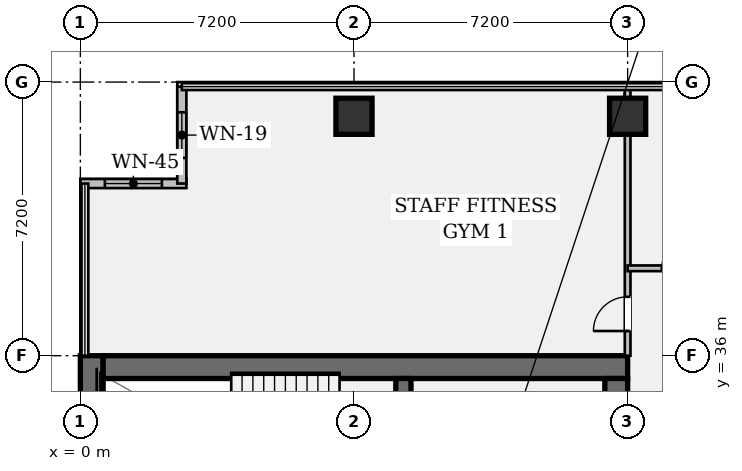
"""IFC4 building model, lengths in metres.
Left out: names, types, materials, properties, quantities, classifications, styles, units other than length and angle.
Written with IfcOpenShell. Run it as: python <this file> out.ifc"""

import sys

from ifc_helpers import new_model, si_unit, direction, frame, frame_2d, origin, origin_2d, place, context, subcontext, project, spatial, rectangle, hollow_rectangle, extrude, element, fill, save


model = new_model("IFC4")
c1 = context("Model", 3, precision=1e-05, world=origin(), true_north=direction((0.0, 1.0)))
c2 = subcontext(c1, "Body", "Model", "MODEL_VIEW")
j1 = project(units=[si_unit("LENGTHUNIT", "METRE"), si_unit("PLANEANGLEUNIT", "RADIAN")], contexts=[c1])
p1 = place(None, origin())
s1 = spatial("IfcSite", under=j1, at=p1, CompositionType="ELEMENT")
p2 = place(p1, origin())
s2 = spatial("IfcBuilding", under=s1, at=p2, CompositionType="ELEMENT")
p3 = place(p2, frame((0.0, 0.0, 81.2)))
s3 = spatial("IfcBuildingStorey", under=s2, at=p3, CompositionType="ELEMENT", Elevation=81.2)
p4 = place(p3, frame((0.3, 7.2, 0.0), z_axis=(0.0, 0.0, 1.0), x_axis=(0.0, 1.0, 0.0)))
e1 = element("IfcWall", 1, at=p4, inside=s3, PredefinedType="SHEAR", context=c2, shape_type="SweptSolid", body=[
    extrude(rectangle(XDim=28.8, YDim=0.6, at=frame_2d((14.4, 0.0))), origin(), (0.0, 0.0, 1.0), 3.57),
])
p5 = place(p3, frame((0.6, 35.7, 0.0), z_axis=(0.0, 0.0, 1.0), x_axis=(1.0, 0.0, 0.0)))
e2 = element("IfcWall", 2, at=p5, inside=s3, PredefinedType="SHEAR", context=c2, shape_type="SweptSolid", body=[
    extrude(rectangle(XDim=13.8, YDim=0.6, at=frame_2d((6.9, 0.0))), origin(), (0.0, 0.0, 1.0), 3.57),
])
p6 = place(p3, frame((14.1, 35.4, 0.0), z_axis=(0.0, 0.0, 1.0), x_axis=(0.0, -1.0, 0.0)))
e3 = element("IfcWall", 3, at=p6, inside=s3, PredefinedType="SHEAR", context=c2, shape_type="SweptSolid", body=[
    extrude(rectangle(XDim=27.6, YDim=0.6, at=frame_2d((13.8, 0.0))), origin(), (0.0, 0.0, 1.0), 3.57),
])
p7 = place(p6, frame((1.3, 0.0, 0.0)))
e4 = element("IfcOpeningElement", 4, at=p7, cuts=e3, PredefinedType="OPENING", context=c2, shape_type="SweptSolid", body=[
    extrude(rectangle(XDim=1.2, YDim=2.15, at=frame_2d((0.6, 1.075))), frame((0.0, 0.312, 0.0), z_axis=(0.0, -1.0, 0.0), x_axis=(1.0, 0.0, 0.0)), (0.0, 0.0, 1.0), 0.624),
])
p8 = place(p6, frame((25.25, 0.0, 0.0)))
e5 = element("IfcOpeningElement", 5, at=p8, cuts=e3, PredefinedType="OPENING", context=c2, shape_type="SweptSolid", body=[
    extrude(rectangle(XDim=1.2, YDim=2.15, at=frame_2d((0.6, 1.075))), frame((0.0, 0.312, 0.0), z_axis=(0.0, -1.0, 0.0), x_axis=(1.0, 0.0, 0.0)), (0.0, 0.0, 1.0), 0.624),
])
p9 = place(p6, frame((14.6, 0.0, 0.0)))
e6 = element("IfcOpeningElement", 6, at=p9, cuts=e3, PredefinedType="OPENING", context=c2, shape_type="SweptSolid", body=[
    extrude(rectangle(XDim=1.6, YDim=2.2, at=frame_2d((0.8, 1.1))), frame((0.0, 0.312, 0.0), z_axis=(0.0, -1.0, 0.0), x_axis=(1.0, 0.0, 0.0)), (0.0, 0.0, 1.0), 0.624),
])
p10 = place(p3, frame((8.5, 31.72, 0.0), z_axis=(0.0, 0.0, 1.0), x_axis=(0.0, 1.0, 0.0)))
e7 = element("IfcWall", 7, at=p10, inside=s3, PredefinedType="SHEAR", context=c2, shape_type="SweptSolid", body=[
    extrude(rectangle(XDim=3.68, YDim=0.4, at=frame_2d((1.84, 0.0))), origin(), (0.0, 0.0, 1.0), 3.57),
])
p11 = place(p10, frame((0.9, 0.0, 0.0)))
e8 = element("IfcOpeningElement", 8, at=p11, cuts=e7, PredefinedType="OPENING", context=c2, shape_type="SweptSolid", body=[
    extrude(rectangle(XDim=1.1, YDim=2.15, at=frame_2d((0.55, 1.075))), frame((0.0, 0.212, 0.0), z_axis=(0.0, -1.0, 0.0), x_axis=(1.0, 0.0, 0.0)), (0.0, 0.0, 1.0), 0.424),
])
for number, where, z_axis, x_axis in (
    (9, (7.2, 42.3, 0.0), (0.0, 0.0, 1.0), (1.0, 0.0, 0.0)),
    (10, (14.4, 42.3, 0.0), (0.0, 0.0, 1.0), (1.0, 0.0, 0.0)),
):
    element("IfcColumn", number, at=place(p3, frame(where, z_axis=z_axis, x_axis=x_axis)), inside=s3, PredefinedType="COLUMN", context=c2, shape_type="SweptSolid", body=[
        extrude(hollow_rectangle(XDim=0.95, YDim=0.95, WallThickness=0.06, at=origin_2d()), origin(), (0.0, 0.0, 1.0), 3.57),
    ])
p12 = place(p3, frame((0.0, 40.53, 0.0), z_axis=(0.0, 0.0, 1.0), x_axis=(1.0, 0.0, 0.0)))
e11 = element("IfcWall", 11, at=p12, inside=s3, PredefinedType="STANDARD", context=c2, shape_type="SweptSolid", body=[
    extrude(rectangle(XDim=2.79, YDim=0.24, at=frame_2d((1.395, 0.0))), origin(), (0.0, 0.0, 1.0), 3.57),
])
p13 = place(p12, frame((0.645, 0.0, 0.95)))
e12 = element("IfcOpeningElement", 12, at=p13, cuts=e11, PredefinedType="OPENING", context=c2, shape_type="SweptSolid", body=[
    extrude(rectangle(XDim=1.5, YDim=1.8, at=frame_2d((0.75, 0.9))), frame((0.0, 0.132, 0.0), z_axis=(0.0, -1.0, 0.0), x_axis=(1.0, 0.0, 0.0)), (0.0, 0.0, 1.0), 0.264),
])
p14 = place(p3, frame((2.67, 40.53, 0.0), z_axis=(0.0, 0.0, 1.0), x_axis=(0.0, 1.0, 0.0)))
e13 = element("IfcWall", 13, at=p14, inside=s3, PredefinedType="STANDARD", context=c2, shape_type="SweptSolid", body=[
    extrude(rectangle(XDim=2.55, YDim=0.24, at=frame_2d((1.275, 0.0))), origin(), (0.0, 0.0, 1.0), 3.57),
])
p15 = place(p14, frame((0.675, 0.0, 0.95)))
e14 = element("IfcOpeningElement", 14, at=p15, cuts=e13, PredefinedType="OPENING", context=c2, shape_type="SweptSolid", body=[
    extrude(rectangle(XDim=1.2, YDim=1.8, at=frame_2d((0.6, 0.9))), frame((0.0, 0.132, 0.0), z_axis=(0.0, -1.0, 0.0), x_axis=(1.0, 0.0, 0.0)), (0.0, 0.0, 1.0), 0.264),
])
p16 = place(p3, frame((14.4, 36.0, 0.0), z_axis=(0.0, 0.0, 1.0), x_axis=(0.0, 1.0, 0.0)))
e15 = element("IfcWall", 15, at=p16, inside=s3, PredefinedType="PARTITIONING", context=c2, shape_type="SweptSolid", body=[
    extrude(rectangle(XDim=7.08, YDim=0.15, at=frame_2d((3.54, 0.0))), origin(), (0.0, 0.0, 1.0), 2.783),
])
p17 = place(p16, frame((0.65, 0.0, 0.0)))
e16 = element("IfcOpeningElement", 16, at=p17, cuts=e15, PredefinedType="OPENING", context=c2, shape_type="SweptSolid", body=[
    extrude(rectangle(XDim=0.9, YDim=2.15, at=frame_2d((0.45, 1.075))), frame((0.0, 0.087, 0.0), z_axis=(0.0, -1.0, 0.0), x_axis=(1.0, 0.0, 0.0)), (0.0, 0.0, 1.0), 0.174),
])
p18 = place(p3, frame((14.4, 38.3, 0.0), z_axis=(0.0, 0.0, 1.0), x_axis=(1.0, 0.0, 0.0)))
e17 = element("IfcWall", 17, at=p18, inside=s3, PredefinedType="PARTITIONING", context=c2, shape_type="SweptSolid", body=[
    extrude(rectangle(XDim=2.95, YDim=0.15, at=frame_2d((1.475, 0.0))), origin(), (0.0, 0.0, 1.0), 2.783),
])
p19 = place(p18, frame((0.9, 0.0, 0.0)))
e18 = element("IfcOpeningElement", 18, at=p19, cuts=e17, PredefinedType="OPENING", context=c2, shape_type="SweptSolid", body=[
    extrude(rectangle(XDim=0.95, YDim=2.15, at=frame_2d((0.475, 1.075))), frame((0.0, 0.087, 0.0), z_axis=(0.0, -1.0, 0.0), x_axis=(1.0, 0.0, 0.0)), (0.0, 0.0, 1.0), 0.174),
])
p20 = place(p13, origin())
e19 = element("IfcWindow", 19, at=p20, inside=s3, PartitioningType="SINGLE_PANEL", PredefinedType="WINDOW", context=c2, shape_type="SweptSolid", body=[
    extrude(rectangle(XDim=1.5, YDim=1.8, at=frame_2d((0.75, 0.9))), frame((0.0, 0.03, 0.0), z_axis=(0.0, -1.0, 0.0), x_axis=(1.0, 0.0, 0.0)), (0.0, 0.0, 1.0), 0.06),
])
fill(e12, e19)
p21 = place(p15, origin())
e20 = element("IfcWindow", 20, at=p21, inside=s3, PartitioningType="SINGLE_PANEL", PredefinedType="WINDOW", context=c2, shape_type="SweptSolid", body=[
    extrude(rectangle(XDim=1.2, YDim=1.8, at=frame_2d((0.6, 0.9))), frame((0.0, 0.03, 0.0), z_axis=(0.0, -1.0, 0.0), x_axis=(1.0, 0.0, 0.0)), (0.0, 0.0, 1.0), 0.06),
])
fill(e14, e20)
p22 = place(p17, origin())
e21 = element("IfcDoor", 21, at=p22, inside=s3, OperationType="SINGLE_SWING_LEFT", PredefinedType="DOOR", context=c2, shape_type="SweptSolid", body=[
    extrude(rectangle(XDim=0.9, YDim=2.15, at=frame_2d((0.45, 1.075))), frame((0.0, 0.025, 0.0), z_axis=(0.0, -1.0, 0.0), x_axis=(1.0, 0.0, 0.0)), (0.0, 0.0, 1.0), 0.05),
])
fill(e16, e21)
p23 = place(p19, origin())
e22 = element("IfcDoor", 22, at=p23, inside=s3, OperationType="SINGLE_SWING_RIGHT", PredefinedType="DOOR", context=c2, shape_type="SweptSolid", body=[
    extrude(rectangle(XDim=0.95, YDim=2.15, at=frame_2d((0.475, 1.075))), frame((0.0, 0.025, 0.0), z_axis=(0.0, -1.0, 0.0), x_axis=(1.0, 0.0, 0.0)), (0.0, 0.0, 1.0), 0.05),
])
fill(e18, e22)
save(model, sys.argv[1])
